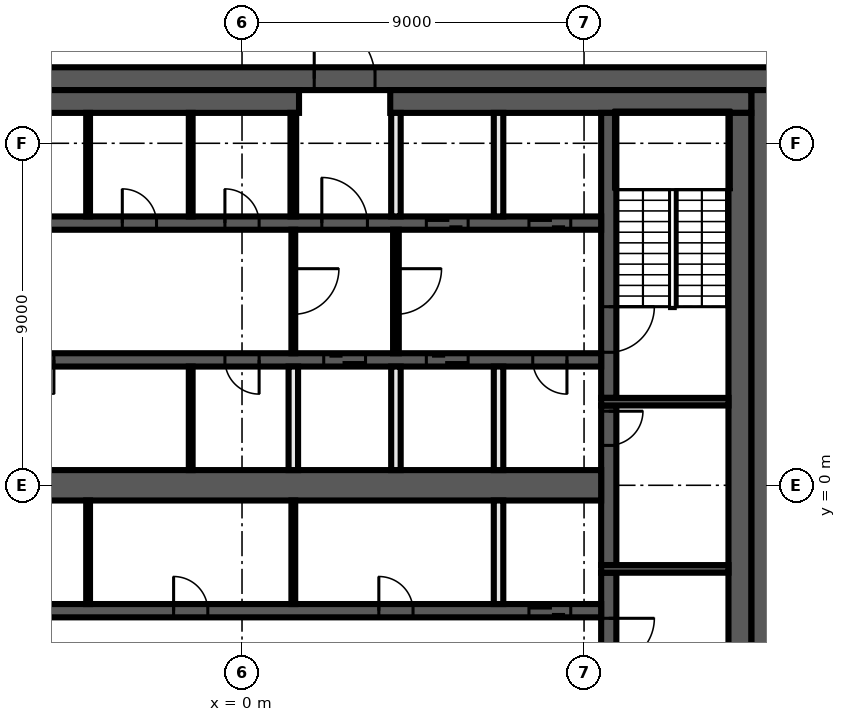
"""IFC4 building model, lengths in metres.
Left out: names, types, materials, properties, quantities, classifications, styles, units other than length and angle.
Written with IfcOpenShell. Run it as: python <this file> out.ifc"""

import sys

from ifc_helpers import new_model, si_unit, direction, frame, frame_2d, origin, place, context, subcontext, project, spatial, rectangle, extrude, element, fill, save


model = new_model("IFC4")
c1 = context("Model", 3, precision=1e-05, world=origin(), true_north=direction((0.0, 1.0)))
c2 = subcontext(c1, "Body", "Model", "MODEL_VIEW")
j1 = project(units=[si_unit("LENGTHUNIT", "METRE"), si_unit("PLANEANGLEUNIT", "RADIAN")], contexts=[c1])
p1 = place(None, origin())
s1 = spatial("IfcSite", under=j1, at=p1, CompositionType="ELEMENT")
p2 = place(p1, origin())
s2 = spatial("IfcBuilding", under=s1, at=p2, CompositionType="ELEMENT")
p3 = place(p2, frame((0.0, 0.0, 323.6)))
s3 = spatial("IfcBuildingStorey", under=s2, at=p3, CompositionType="ELEMENT", Elevation=323.6)
p4 = place(p3, frame((-14.0, 10.7, 0.0), z_axis=(0.0, 0.0, 1.0), x_axis=(1.0, 0.0, 0.0)))
e1 = element("IfcWall", 1, at=p4, inside=s3, PredefinedType="SHEAR", context=c2, shape_type="SweptSolid", body=[
    extrude(rectangle(XDim=28.0, YDim=0.6, at=frame_2d((14.0, 0.0))), origin(), (0.0, 0.0, 1.0), 3.82),
])
p5 = place(p4, frame((15.9, 0.0, 0.0)))
e2 = element("IfcOpeningElement", 2, at=p5, cuts=e1, PredefinedType="OPENING", context=c2, shape_type="SweptSolid", body=[
    extrude(rectangle(XDim=1.6, YDim=2.1, at=frame_2d((0.8, 1.05))), frame((0.0, 0.31, 0.0), z_axis=(0.0, -1.0, 0.0), x_axis=(1.0, 0.0, 0.0)), (0.0, 0.0, 1.0), 0.62),
])
p6 = place(p3, frame((13.7, 10.4, 0.0), z_axis=(0.0, 0.0, 1.0), x_axis=(0.0, -1.0, 0.0)))
e3 = element("IfcWall", 3, at=p6, inside=s3, PredefinedType="SHEAR", context=c2, shape_type="SweptSolid", body=[
    extrude(rectangle(XDim=20.8, YDim=0.6, at=frame_2d((10.4, 0.0))), origin(), (0.0, 0.0, 1.0), 3.82),
])
p7 = place(p3, frame((-13.4, 10.1, 0.0), z_axis=(0.0, 0.0, 1.0), x_axis=(1.0, 0.0, 0.0)))
e4 = element("IfcWall", 4, at=p7, inside=s3, PredefinedType="SHEAR", context=c2, shape_type="SweptSolid", body=[
    extrude(rectangle(XDim=14.9, YDim=0.6, at=frame_2d((7.45, 0.0))), origin(), (0.0, 0.0, 1.0), 3.82),
])
p8 = place(p3, frame((3.9, 10.1, 0.0), z_axis=(0.0, 0.0, 1.0), x_axis=(1.0, 0.0, 0.0)))
e5 = element("IfcWall", 5, at=p8, inside=s3, PredefinedType="SHEAR", context=c2, shape_type="SweptSolid", body=[
    extrude(rectangle(XDim=9.5, YDim=0.6, at=frame_2d((4.75, 0.0))), origin(), (0.0, 0.0, 1.0), 3.82),
])
p9 = place(p3, frame((13.1, 9.8, 0.0), z_axis=(0.0, 0.0, 1.0), x_axis=(0.0, -1.0, 0.0)))
e6 = element("IfcWall", 6, at=p9, inside=s3, PredefinedType="SHEAR", context=c2, shape_type="SweptSolid", body=[
    extrude(rectangle(XDim=19.6, YDim=0.6, at=frame_2d((9.8, 0.0))), origin(), (0.0, 0.0, 1.0), 3.82),
])
p10 = place(p3, frame((9.65, -2.3, 0.0), z_axis=(0.0, 0.0, 1.0), x_axis=(0.0, -1.0, 0.0)))
e7 = element("IfcWall", 7, at=p10, inside=s3, PredefinedType="SHEAR", context=c2, shape_type="SweptSolid", body=[
    extrude(rectangle(XDim=7.5, YDim=0.4, at=frame_2d((3.75, 0.0))), origin(), (0.0, 0.0, 1.0), 3.82),
])
p11 = place(p10, frame((1.2, 0.0, 0.0)))
e8 = element("IfcOpeningElement", 8, at=p11, cuts=e7, PredefinedType="OPENING", context=c2, shape_type="SweptSolid", body=[
    extrude(rectangle(XDim=1.2, YDim=2.1, at=frame_2d((0.6, 1.05))), frame((0.0, 0.21, 0.0), z_axis=(0.0, -1.0, 0.0), x_axis=(1.0, 0.0, 0.0)), (0.0, 0.0, 1.0), 0.42),
])
p12 = place(p3, frame((9.65, 2.1, 0.0), z_axis=(0.0, 0.0, 1.0), x_axis=(0.0, -1.0, 0.0)))
e9 = element("IfcWall", 9, at=p12, inside=s3, PredefinedType="SHEAR", context=c2, shape_type="SweptSolid", body=[
    extrude(rectangle(XDim=4.2, YDim=0.4, at=frame_2d((2.1, 0.0))), origin(), (0.0, 0.0, 1.0), 3.82),
])
p13 = place(p12, frame((0.15, 0.0, 0.0)))
e10 = element("IfcOpeningElement", 10, at=p13, cuts=e9, PredefinedType="OPENING", context=c2, shape_type="SweptSolid", body=[
    extrude(rectangle(XDim=0.9, YDim=2.1, at=frame_2d((0.45, 1.05))), frame((0.0, 0.21, 0.0), z_axis=(0.0, -1.0, 0.0), x_axis=(1.0, 0.0, 0.0)), (0.0, 0.0, 1.0), 0.42),
])
p14 = place(p3, frame((9.65, 9.8, 0.0), z_axis=(0.0, 0.0, 1.0), x_axis=(0.0, -1.0, 0.0)))
e11 = element("IfcWall", 11, at=p14, inside=s3, PredefinedType="SHEAR", context=c2, shape_type="SweptSolid", body=[
    extrude(rectangle(XDim=7.5, YDim=0.4, at=frame_2d((3.75, 0.0))), origin(), (0.0, 0.0, 1.0), 3.82),
])
p15 = place(p14, frame((5.1, 0.0, 0.0)))
e12 = element("IfcOpeningElement", 12, at=p15, cuts=e11, PredefinedType="OPENING", context=c2, shape_type="SweptSolid", body=[
    extrude(rectangle(XDim=1.2, YDim=2.1, at=frame_2d((0.6, 1.05))), frame((0.0, 0.21, 0.0), z_axis=(0.0, -1.0, 0.0), x_axis=(1.0, 0.0, 0.0)), (0.0, 0.0, 1.0), 0.42),
])
for number, where, z_axis, x_axis in (
    (13, (9.45, 2.2, 0.0), (0.0, 0.0, 1.0), (1.0, 0.0, 0.0)),
    (14, (9.45, -2.2, 0.0), (0.0, 0.0, 1.0), (1.0, 0.0, 0.0)),
):
    element("IfcWall", number, at=place(p3, frame(where, z_axis=z_axis, x_axis=x_axis)), inside=s3, PredefinedType="SHEAR", context=c2, shape_type="SweptSolid", body=[
        extrude(rectangle(XDim=3.35, YDim=0.2, at=frame_2d((1.675, 0.0))), origin(), (0.0, 0.0, 1.0), 3.82),
    ])
p16 = place(p3, frame((-9.45, 6.9, 0.0), z_axis=(0.0, 0.0, 1.0), x_axis=(1.0, 0.0, 0.0)))
e15 = element("IfcWall", 15, at=p16, inside=s3, PredefinedType="SHEAR", context=c2, shape_type="SweptSolid", body=[
    extrude(rectangle(XDim=18.9, YDim=0.35, at=frame_2d((9.45, 0.0))), origin(), (0.0, 0.0, 1.0), 3.82),
])
p17 = place(p16, frame((11.55, 0.0, 0.0)))
e16 = element("IfcOpeningElement", 16, at=p17, cuts=e15, PredefinedType="OPENING", context=c2, shape_type="SweptSolid", body=[
    extrude(rectangle(XDim=1.2, YDim=2.1, at=frame_2d((0.6, 1.05))), frame((0.0, 0.185, 0.0), z_axis=(0.0, -1.0, 0.0), x_axis=(1.0, 0.0, 0.0)), (0.0, 0.0, 1.0), 0.37),
])
p18 = place(p16, frame((14.3, 0.0, 0.0)))
e17 = element("IfcOpeningElement", 17, at=p18, cuts=e15, PredefinedType="OPENING", context=c2, shape_type="SweptSolid", body=[
    extrude(rectangle(XDim=1.1, YDim=2.1, at=frame_2d((0.55, 1.05))), frame((0.0, 0.185, 0.0), z_axis=(0.0, -1.0, 0.0), x_axis=(1.0, 0.0, 0.0)), (0.0, 0.0, 1.0), 0.37),
])
p19 = place(p16, frame((17.0, 0.0, 0.0)))
e18 = element("IfcOpeningElement", 18, at=p19, cuts=e15, PredefinedType="OPENING", context=c2, shape_type="SweptSolid", body=[
    extrude(rectangle(XDim=1.1, YDim=2.1, at=frame_2d((0.55, 1.05))), frame((0.0, 0.185, 0.0), z_axis=(0.0, -1.0, 0.0), x_axis=(1.0, 0.0, 0.0)), (0.0, 0.0, 1.0), 0.37),
])
p20 = place(p16, frame((2.25, 0.0, 0.0)))
e19 = element("IfcOpeningElement", 19, at=p20, cuts=e15, PredefinedType="OPENING", context=c2, shape_type="SweptSolid", body=[
    extrude(rectangle(XDim=0.9, YDim=2.1, at=frame_2d((0.45, 1.05))), frame((0.0, 0.185, 0.0), z_axis=(0.0, -1.0, 0.0), x_axis=(1.0, 0.0, 0.0)), (0.0, 0.0, 1.0), 0.37),
])
p21 = place(p16, frame((6.3, 0.0, 0.0)))
e20 = element("IfcOpeningElement", 20, at=p21, cuts=e15, PredefinedType="OPENING", context=c2, shape_type="SweptSolid", body=[
    extrude(rectangle(XDim=0.9, YDim=2.1, at=frame_2d((0.45, 1.05))), frame((0.0, 0.185, 0.0), z_axis=(0.0, -1.0, 0.0), x_axis=(1.0, 0.0, 0.0)), (0.0, 0.0, 1.0), 0.37),
])
p22 = place(p16, frame((9.0, 0.0, 0.0)))
e21 = element("IfcOpeningElement", 21, at=p22, cuts=e15, PredefinedType="OPENING", context=c2, shape_type="SweptSolid", body=[
    extrude(rectangle(XDim=0.9, YDim=2.1, at=frame_2d((0.45, 1.05))), frame((0.0, 0.185, 0.0), z_axis=(0.0, -1.0, 0.0), x_axis=(1.0, 0.0, 0.0)), (0.0, 0.0, 1.0), 0.37),
])
p23 = place(p3, frame((9.45, 3.3, 0.0), z_axis=(0.0, 0.0, 1.0), x_axis=(-1.0, 0.0, 0.0)))
e22 = element("IfcWall", 22, at=p23, inside=s3, PredefinedType="SHEAR", context=c2, shape_type="SweptSolid", body=[
    extrude(rectangle(XDim=18.9, YDim=0.35, at=frame_2d((9.45, 0.0))), origin(), (0.0, 0.0, 1.0), 3.82),
])
p24 = place(p23, frame((6.2, 0.0, 0.0)))
e23 = element("IfcOpeningElement", 23, at=p24, cuts=e22, PredefinedType="OPENING", context=c2, shape_type="SweptSolid", body=[
    extrude(rectangle(XDim=1.1, YDim=2.1, at=frame_2d((0.55, 1.05))), frame((0.0, 0.185, 0.0), z_axis=(0.0, -1.0, 0.0), x_axis=(1.0, 0.0, 0.0)), (0.0, 0.0, 1.0), 0.37),
])
p25 = place(p23, frame((3.5, 0.0, 0.0)))
e24 = element("IfcOpeningElement", 24, at=p25, cuts=e22, PredefinedType="OPENING", context=c2, shape_type="SweptSolid", body=[
    extrude(rectangle(XDim=1.1, YDim=2.1, at=frame_2d((0.55, 1.05))), frame((0.0, 0.185, 0.0), z_axis=(0.0, -1.0, 0.0), x_axis=(1.0, 0.0, 0.0)), (0.0, 0.0, 1.0), 0.37),
])
p26 = place(p23, frame((0.9, 0.0, 0.0)))
e25 = element("IfcOpeningElement", 25, at=p26, cuts=e22, PredefinedType="OPENING", context=c2, shape_type="SweptSolid", body=[
    extrude(rectangle(XDim=0.9, YDim=2.1, at=frame_2d((0.45, 1.05))), frame((0.0, 0.185, 0.0), z_axis=(0.0, -1.0, 0.0), x_axis=(1.0, 0.0, 0.0)), (0.0, 0.0, 1.0), 0.37),
])
p27 = place(p23, frame((14.4, 0.0, 0.0)))
e26 = element("IfcOpeningElement", 26, at=p27, cuts=e22, PredefinedType="OPENING", context=c2, shape_type="SweptSolid", body=[
    extrude(rectangle(XDim=0.9, YDim=2.1, at=frame_2d((0.45, 1.05))), frame((0.0, 0.185, 0.0), z_axis=(0.0, -1.0, 0.0), x_axis=(1.0, 0.0, 0.0)), (0.0, 0.0, 1.0), 0.37),
])
p28 = place(p23, frame((9.0, 0.0, 0.0)))
e27 = element("IfcOpeningElement", 27, at=p28, cuts=e22, PredefinedType="OPENING", context=c2, shape_type="SweptSolid", body=[
    extrude(rectangle(XDim=0.9, YDim=2.1, at=frame_2d((0.45, 1.05))), frame((0.0, 0.185, 0.0), z_axis=(0.0, -1.0, 0.0), x_axis=(1.0, 0.0, 0.0)), (0.0, 0.0, 1.0), 0.37),
])
p29 = place(p3, frame((-9.45, -3.3, 0.0), z_axis=(0.0, 0.0, 1.0), x_axis=(1.0, 0.0, 0.0)))
e28 = element("IfcWall", 28, at=p29, inside=s3, PredefinedType="SHEAR", context=c2, shape_type="SweptSolid", body=[
    extrude(rectangle(XDim=18.9, YDim=0.35, at=frame_2d((9.45, 0.0))), origin(), (0.0, 0.0, 1.0), 3.82),
])
p30 = place(p29, frame((17.0, 0.0, 0.0)))
e29 = element("IfcOpeningElement", 29, at=p30, cuts=e28, PredefinedType="OPENING", context=c2, shape_type="SweptSolid", body=[
    extrude(rectangle(XDim=1.1, YDim=2.1, at=frame_2d((0.55, 1.05))), frame((0.0, 0.185, 0.0), z_axis=(0.0, -1.0, 0.0), x_axis=(1.0, 0.0, 0.0)), (0.0, 0.0, 1.0), 0.37),
])
p31 = place(p29, frame((2.25, 0.0, 0.0)))
e30 = element("IfcOpeningElement", 30, at=p31, cuts=e28, PredefinedType="OPENING", context=c2, shape_type="SweptSolid", body=[
    extrude(rectangle(XDim=0.9, YDim=2.1, at=frame_2d((0.45, 1.05))), frame((0.0, 0.185, 0.0), z_axis=(0.0, -1.0, 0.0), x_axis=(1.0, 0.0, 0.0)), (0.0, 0.0, 1.0), 0.37),
])
p32 = place(p29, frame((7.65, 0.0, 0.0)))
e31 = element("IfcOpeningElement", 31, at=p32, cuts=e28, PredefinedType="OPENING", context=c2, shape_type="SweptSolid", body=[
    extrude(rectangle(XDim=0.9, YDim=2.1, at=frame_2d((0.45, 1.05))), frame((0.0, 0.185, 0.0), z_axis=(0.0, -1.0, 0.0), x_axis=(1.0, 0.0, 0.0)), (0.0, 0.0, 1.0), 0.37),
])
p33 = place(p29, frame((13.05, 0.0, 0.0)))
e32 = element("IfcOpeningElement", 32, at=p33, cuts=e28, PredefinedType="OPENING", context=c2, shape_type="SweptSolid", body=[
    extrude(rectangle(XDim=0.9, YDim=2.1, at=frame_2d((0.45, 1.05))), frame((0.0, 0.185, 0.0), z_axis=(0.0, -1.0, 0.0), x_axis=(1.0, 0.0, 0.0)), (0.0, 0.0, 1.0), 0.37),
])
p34 = place(p3, frame((-9.45, 0.0, 0.0), z_axis=(0.0, 0.0, 1.0), x_axis=(1.0, 0.0, 0.0)))
e33 = element("IfcWall", 33, at=p34, inside=s3, PredefinedType="SHEAR", context=c2, shape_type="SweptSolid", body=[
    extrude(rectangle(XDim=18.9, YDim=0.8, at=frame_2d((9.45, 0.0))), origin(), (0.0, 0.0, 1.0), 3.82),
])
for number, where, z_axis, x_axis in (
    (34, (6.75, -3.125, 0.0), (0.0, 0.0, 1.0), (0.0, 1.0, 0.0)),
    (35, (6.75, 0.4, 0.0), (0.0, 0.0, 1.0), (0.0, 1.0, 0.0)),
    (36, (6.75, 7.075, 0.0), (0.0, 0.0, 1.0), (0.0, 1.0, 0.0)),
):
    element("IfcWall", number, at=place(p3, frame(where, z_axis=z_axis, x_axis=x_axis)), inside=s3, PredefinedType="SOLIDWALL", context=c2, shape_type="SweptSolid", body=[
        extrude(rectangle(XDim=2.725, YDim=0.25, at=frame_2d((1.363, 0.0))), origin(), (0.0, 0.0, 1.0), 3.82),
    ])
p35 = place(p3, frame((4.05, 6.725, 0.0), z_axis=(0.0, 0.0, 1.0), x_axis=(0.0, -1.0, 0.0)))
e37 = element("IfcWall", 37, at=p35, inside=s3, PredefinedType="PARTITIONING", context=c2, shape_type="SweptSolid", body=[
    extrude(rectangle(XDim=3.25, YDim=0.15, at=frame_2d((1.625, 0.0))), origin(), (0.0, 0.0, 1.0), 3.82),
])
p36 = place(p35, frame((1.025, 0.0, 0.0)))
e38 = element("IfcOpeningElement", 38, at=p36, cuts=e37, PredefinedType="OPENING", context=c2, shape_type="SweptSolid", body=[
    extrude(rectangle(XDim=1.2, YDim=2.1, at=frame_2d((0.6, 1.05))), frame((0.0, 0.085, 0.0), z_axis=(0.0, -1.0, 0.0), x_axis=(1.0, 0.0, 0.0)), (0.0, 0.0, 1.0), 0.17),
])
for number, where, z_axis, x_axis in (
    (39, (4.05, 0.4, 0.0), (0.0, 0.0, 1.0), (0.0, 1.0, 0.0)),
    (40, (4.05, 7.075, 0.0), (0.0, 0.0, 1.0), (0.0, 1.0, 0.0)),
):
    element("IfcWall", number, at=place(p3, frame(where, z_axis=z_axis, x_axis=x_axis)), inside=s3, PredefinedType="SOLIDWALL", context=c2, shape_type="SweptSolid", body=[
        extrude(rectangle(XDim=2.725, YDim=0.25, at=frame_2d((1.363, 0.0))), origin(), (0.0, 0.0, 1.0), 3.82),
    ])
p37 = place(p3, frame((1.35, 7.075, 0.0), z_axis=(0.0, 0.0, 1.0), x_axis=(0.0, 1.0, 0.0)))
e41 = element("IfcWall", 41, at=p37, inside=s3, PredefinedType="PARTITIONING", context=c2, shape_type="SweptSolid", body=[
    extrude(rectangle(XDim=2.725, YDim=0.15, at=frame_2d((1.363, 0.0))), origin(), (0.0, 0.0, 1.0), 3.82),
])
p38 = place(p3, frame((1.35, -3.125, 0.0), z_axis=(0.0, 0.0, 1.0), x_axis=(0.0, 1.0, 0.0)))
e42 = element("IfcWall", 42, at=p38, inside=s3, PredefinedType="PARTITIONING", context=c2, shape_type="SweptSolid", body=[
    extrude(rectangle(XDim=2.725, YDim=0.1, at=frame_2d((1.363, 0.0))), origin(), (0.0, 0.0, 1.0), 3.82),
])
p39 = place(p3, frame((1.35, 6.725, 0.0), z_axis=(0.0, 0.0, 1.0), x_axis=(0.0, -1.0, 0.0)))
e43 = element("IfcWall", 43, at=p39, inside=s3, PredefinedType="PARTITIONING", context=c2, shape_type="SweptSolid", body=[
    extrude(rectangle(XDim=3.25, YDim=0.1, at=frame_2d((1.625, 0.0))), origin(), (0.0, 0.0, 1.0), 3.82),
])
p40 = place(p39, frame((1.025, 0.0, 0.0)))
e44 = element("IfcOpeningElement", 44, at=p40, cuts=e43, PredefinedType="OPENING", context=c2, shape_type="SweptSolid", body=[
    extrude(rectangle(XDim=1.2, YDim=2.1, at=frame_2d((0.6, 1.05))), frame((0.0, 0.06, 0.0), z_axis=(0.0, -1.0, 0.0), x_axis=(1.0, 0.0, 0.0)), (0.0, 0.0, 1.0), 0.12),
])
p41 = place(p3, frame((1.35, 0.4, 0.0), z_axis=(0.0, 0.0, 1.0), x_axis=(0.0, 1.0, 0.0)))
e45 = element("IfcWall", 45, at=p41, inside=s3, PredefinedType="SOLIDWALL", context=c2, shape_type="SweptSolid", body=[
    extrude(rectangle(XDim=2.725, YDim=0.25, at=frame_2d((1.363, 0.0))), origin(), (0.0, 0.0, 1.0), 3.82),
])
for number, where, z_axis, x_axis in (
    (46, (-1.35, 0.4, 0.0), (0.0, 0.0, 1.0), (0.0, 1.0, 0.0)),
    (47, (-1.35, 7.075, 0.0), (0.0, 0.0, 1.0), (0.0, 1.0, 0.0)),
    (48, (-4.05, -3.125, 0.0), (0.0, 0.0, 1.0), (0.0, 1.0, 0.0)),
    (49, (-4.05, 7.075, 0.0), (0.0, 0.0, 1.0), (0.0, 1.0, 0.0)),
):
    element("IfcWall", number, at=place(p3, frame(where, z_axis=z_axis, x_axis=x_axis)), inside=s3, PredefinedType="PARTITIONING", context=c2, shape_type="SweptSolid", body=[
        extrude(rectangle(XDim=2.725, YDim=0.1, at=frame_2d((1.363, 0.0))), origin(), (0.0, 0.0, 1.0), 3.82),
    ])
p42 = place(p13, origin())
e50 = element("IfcDoor", 50, at=p42, inside=s3, OperationType="SINGLE_SWING_RIGHT", PredefinedType="DOOR", context=c2, shape_type="SweptSolid", body=[
    extrude(rectangle(XDim=0.9, YDim=2.1, at=frame_2d((0.45, 1.05))), frame((0.0, 0.025, 0.0), z_axis=(0.0, -1.0, 0.0), x_axis=(1.0, 0.0, 0.0)), (0.0, 0.0, 1.0), 0.05),
])
fill(e10, e50)
p43 = place(p5, origin())
e51 = element("IfcDoor", 51, at=p43, inside=s3, OperationType="DOUBLE_DOOR_SINGLE_SWING", PredefinedType="DOOR", context=c2, shape_type="SweptSolid", body=[
    extrude(rectangle(XDim=1.6, YDim=2.1, at=frame_2d((0.8, 1.05))), frame((0.0, 0.025, 0.0), z_axis=(0.0, -1.0, 0.0), x_axis=(1.0, 0.0, 0.0)), (0.0, 0.0, 1.0), 0.05),
])
fill(e2, e51)
p44 = place(p17, origin())
e52 = element("IfcDoor", 52, at=p44, inside=s3, OperationType="SINGLE_SWING_LEFT", PredefinedType="DOOR", context=c2, shape_type="SweptSolid", body=[
    extrude(rectangle(XDim=1.2, YDim=2.1, at=frame_2d((0.6, 1.05))), frame((0.0, 0.025, 0.0), z_axis=(0.0, -1.0, 0.0), x_axis=(1.0, 0.0, 0.0)), (0.0, 0.0, 1.0), 0.05),
])
fill(e16, e52)
p45 = place(p18, origin())
e53 = element("IfcDoor", 53, at=p45, inside=s3, OperationType="DOUBLE_DOOR_SLIDING", PredefinedType="DOOR", context=c2, shape_type="SweptSolid", body=[
    extrude(rectangle(XDim=1.1, YDim=2.1, at=frame_2d((0.55, 1.05))), frame((0.0, 0.025, 0.0), z_axis=(0.0, -1.0, 0.0), x_axis=(1.0, 0.0, 0.0)), (0.0, 0.0, 1.0), 0.05),
])
fill(e17, e53)
p46 = place(p19, origin())
e54 = element("IfcDoor", 54, at=p46, inside=s3, OperationType="DOUBLE_DOOR_SLIDING", PredefinedType="DOOR", context=c2, shape_type="SweptSolid", body=[
    extrude(rectangle(XDim=1.1, YDim=2.1, at=frame_2d((0.55, 1.05))), frame((0.0, 0.025, 0.0), z_axis=(0.0, -1.0, 0.0), x_axis=(1.0, 0.0, 0.0)), (0.0, 0.0, 1.0), 0.05),
])
fill(e18, e54)
p47 = place(p24, origin())
e55 = element("IfcDoor", 55, at=p47, inside=s3, OperationType="DOUBLE_DOOR_SLIDING", PredefinedType="DOOR", context=c2, shape_type="SweptSolid", body=[
    extrude(rectangle(XDim=1.1, YDim=2.1, at=frame_2d((0.55, 1.05))), frame((0.0, 0.025, 0.0), z_axis=(0.0, -1.0, 0.0), x_axis=(1.0, 0.0, 0.0)), (0.0, 0.0, 1.0), 0.05),
])
fill(e23, e55)
p48 = place(p25, origin())
e56 = element("IfcDoor", 56, at=p48, inside=s3, OperationType="DOUBLE_DOOR_SLIDING", PredefinedType="DOOR", context=c2, shape_type="SweptSolid", body=[
    extrude(rectangle(XDim=1.1, YDim=2.1, at=frame_2d((0.55, 1.05))), frame((0.0, 0.025, 0.0), z_axis=(0.0, -1.0, 0.0), x_axis=(1.0, 0.0, 0.0)), (0.0, 0.0, 1.0), 0.05),
])
fill(e24, e56)
p49 = place(p26, origin())
e57 = element("IfcDoor", 57, at=p49, inside=s3, OperationType="SINGLE_SWING_LEFT", PredefinedType="DOOR", context=c2, shape_type="SweptSolid", body=[
    extrude(rectangle(XDim=0.9, YDim=2.1, at=frame_2d((0.45, 1.05))), frame((0.0, 0.025, 0.0), z_axis=(0.0, -1.0, 0.0), x_axis=(1.0, 0.0, 0.0)), (0.0, 0.0, 1.0), 0.05),
])
fill(e25, e57)
p50 = place(p30, origin())
e58 = element("IfcDoor", 58, at=p50, inside=s3, OperationType="DOUBLE_DOOR_SLIDING", PredefinedType="DOOR", context=c2, shape_type="SweptSolid", body=[
    extrude(rectangle(XDim=1.1, YDim=2.1, at=frame_2d((0.55, 1.05))), frame((0.0, 0.025, 0.0), z_axis=(0.0, -1.0, 0.0), x_axis=(1.0, 0.0, 0.0)), (0.0, 0.0, 1.0), 0.05),
])
fill(e29, e58)
p51 = place(p21, origin())
e59 = element("IfcDoor", 59, at=p51, inside=s3, OperationType="SINGLE_SWING_LEFT", PredefinedType="DOOR", context=c2, shape_type="SweptSolid", body=[
    extrude(rectangle(XDim=0.9, YDim=2.1, at=frame_2d((0.45, 1.05))), frame((0.0, 0.025, 0.0), z_axis=(0.0, -1.0, 0.0), x_axis=(1.0, 0.0, 0.0)), (0.0, 0.0, 1.0), 0.05),
])
fill(e20, e59)
p52 = place(p22, origin())
e60 = element("IfcDoor", 60, at=p52, inside=s3, OperationType="SINGLE_SWING_RIGHT", PredefinedType="DOOR", context=c2, shape_type="SweptSolid", body=[
    extrude(rectangle(XDim=0.9, YDim=2.1, at=frame_2d((0.45, 1.05))), frame((0.0, 0.025, 0.0), z_axis=(0.0, -1.0, 0.0), x_axis=(1.0, 0.0, 0.0)), (0.0, 0.0, 1.0), 0.05),
])
fill(e21, e60)
p53 = place(p27, origin())
e61 = element("IfcDoor", 61, at=p53, inside=s3, OperationType="SINGLE_SWING_LEFT", PredefinedType="DOOR", context=c2, shape_type="SweptSolid", body=[
    extrude(rectangle(XDim=0.9, YDim=2.1, at=frame_2d((0.45, 1.05))), frame((0.0, 0.025, 0.0), z_axis=(0.0, -1.0, 0.0), x_axis=(1.0, 0.0, 0.0)), (0.0, 0.0, 1.0), 0.05),
])
fill(e26, e61)
p54 = place(p28, origin())
e62 = element("IfcDoor", 62, at=p54, inside=s3, OperationType="SINGLE_SWING_RIGHT", PredefinedType="DOOR", context=c2, shape_type="SweptSolid", body=[
    extrude(rectangle(XDim=0.9, YDim=2.1, at=frame_2d((0.45, 1.05))), frame((0.0, 0.025, 0.0), z_axis=(0.0, -1.0, 0.0), x_axis=(1.0, 0.0, 0.0)), (0.0, 0.0, 1.0), 0.05),
])
fill(e27, e62)
p55 = place(p32, origin())
e63 = element("IfcDoor", 63, at=p55, inside=s3, OperationType="SINGLE_SWING_RIGHT", PredefinedType="DOOR", context=c2, shape_type="SweptSolid", body=[
    extrude(rectangle(XDim=0.9, YDim=2.1, at=frame_2d((0.45, 1.05))), frame((0.0, 0.025, 0.0), z_axis=(0.0, -1.0, 0.0), x_axis=(1.0, 0.0, 0.0)), (0.0, 0.0, 1.0), 0.05),
])
fill(e31, e63)
p56 = place(p33, origin())
e64 = element("IfcDoor", 64, at=p56, inside=s3, OperationType="SINGLE_SWING_LEFT", PredefinedType="DOOR", context=c2, shape_type="SweptSolid", body=[
    extrude(rectangle(XDim=0.9, YDim=2.1, at=frame_2d((0.45, 1.05))), frame((0.0, 0.025, 0.0), z_axis=(0.0, -1.0, 0.0), x_axis=(1.0, 0.0, 0.0)), (0.0, 0.0, 1.0), 0.05),
])
fill(e32, e64)
p57 = place(p15, origin())
e65 = element("IfcDoor", 65, at=p57, inside=s3, OperationType="SINGLE_SWING_LEFT", PredefinedType="DOOR", context=c2, shape_type="SweptSolid", body=[
    extrude(rectangle(XDim=1.2, YDim=2.1, at=frame_2d((0.6, 1.05))), frame((0.0, 0.025, 0.0), z_axis=(0.0, -1.0, 0.0), x_axis=(1.0, 0.0, 0.0)), (0.0, 0.0, 1.0), 0.05),
])
fill(e12, e65)
p58 = place(p11, origin())
e66 = element("IfcDoor", 66, at=p58, inside=s3, OperationType="SINGLE_SWING_RIGHT", PredefinedType="DOOR", context=c2, shape_type="SweptSolid", body=[
    extrude(rectangle(XDim=1.2, YDim=2.1, at=frame_2d((0.6, 1.05))), frame((0.0, 0.025, 0.0), z_axis=(0.0, -1.0, 0.0), x_axis=(1.0, 0.0, 0.0)), (0.0, 0.0, 1.0), 0.05),
])
fill(e8, e66)
p59 = place(p40, origin())
e67 = element("IfcDoor", 67, at=p59, inside=s3, OperationType="SINGLE_SWING_LEFT", PredefinedType="DOOR", context=c2, shape_type="SweptSolid", body=[
    extrude(rectangle(XDim=1.2, YDim=2.1, at=frame_2d((0.6, 1.05))), frame((0.0, 0.025, 0.0), z_axis=(0.0, -1.0, 0.0), x_axis=(1.0, 0.0, 0.0)), (0.0, 0.0, 1.0), 0.05),
])
fill(e44, e67)
p60 = place(p36, origin())
e68 = element("IfcDoor", 68, at=p60, inside=s3, OperationType="SINGLE_SWING_RIGHT", PredefinedType="DOOR", context=c2, shape_type="SweptSolid", body=[
    extrude(rectangle(XDim=1.2, YDim=2.1, at=frame_2d((0.6, 1.05))), frame((0.0, 0.025, 0.0), z_axis=(0.0, -1.0, 0.0), x_axis=(1.0, 0.0, 0.0)), (0.0, 0.0, 1.0), 0.05),
])
fill(e38, e68)
save(model, sys.argv[1])
